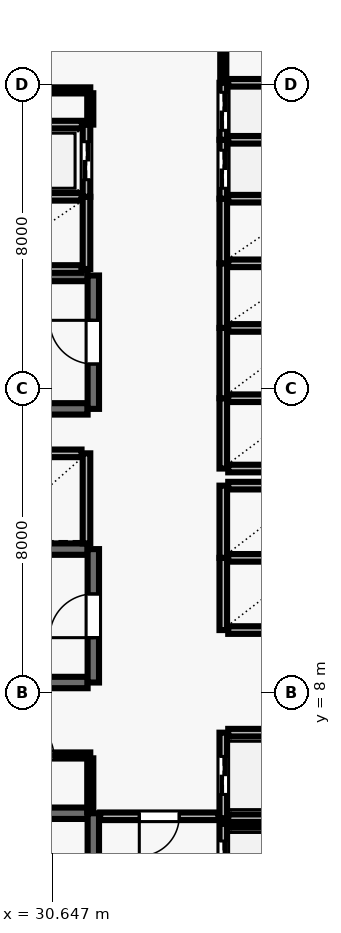
"""IFC4 building model, lengths in metres.
Left out: names, types, materials, properties, quantities, classifications, styles, units other than length and angle.
Written with IfcOpenShell. Run it as: python <this file> out.ifc"""

import sys

from ifc_helpers import new_model, si_unit, direction, frame, frame_2d, origin, place, context, subcontext, project, spatial, rectangle, extrude, element, fill, save


model = new_model("IFC4")
c1 = context("Model", 3, precision=1e-05, world=origin(), true_north=direction((0.0, 1.0)))
c2 = subcontext(c1, "Body", "Model", "MODEL_VIEW")
j1 = project(units=[si_unit("LENGTHUNIT", "METRE"), si_unit("PLANEANGLEUNIT", "RADIAN")], contexts=[c1])
p1 = place(None, origin())
s1 = spatial("IfcSite", under=j1, at=p1, CompositionType="ELEMENT")
p2 = place(p1, origin())
s2 = spatial("IfcBuilding", under=s1, at=p2, CompositionType="ELEMENT")
p3 = place(p2, frame((0.0, 0.0, 54.4)))
s3 = spatial("IfcBuildingStorey", under=s2, at=p3, CompositionType="ELEMENT", Elevation=54.4)
p4 = place(p3, frame((31.58, 4.83, 0.0), z_axis=(0.0, 0.0, 1.0), x_axis=(-1.0, 0.0, 0.0)))
e1 = element("IfcWall", 1, at=p4, inside=s3, PredefinedType="SHEAR", context=c2, shape_type="SweptSolid", body=[
    extrude(rectangle(XDim=8.36, YDim=0.3, at=frame_2d((4.18, 0.0))), origin(), (0.0, 0.0, 1.0), 3.69),
])
p5 = place(p3, frame((31.73, 0.96, 0.0), z_axis=(0.0, 0.0, 1.0), x_axis=(0.0, 1.0, 0.0)))
e2 = element("IfcWall", 2, at=p5, inside=s3, PredefinedType="SHEAR", context=c2, shape_type="SweptSolid", body=[
    extrude(rectangle(XDim=3.87, YDim=0.3, at=frame_2d((1.935, 0.0))), origin(), (0.0, 0.0, 1.0), 3.69),
])
p6 = place(p5, frame((1.54, 0.0, 0.0)))
e3 = element("IfcOpeningElement", 3, at=p6, cuts=e2, PredefinedType="OPENING", context=c2, shape_type="SweptSolid", body=[
    extrude(rectangle(XDim=1.15, YDim=2.15, at=frame_2d((0.575, 1.075))), frame((0.0, 0.16, 0.0), z_axis=(0.0, -1.0, 0.0), x_axis=(1.0, 0.0, 0.0)), (0.0, 0.0, 1.0), 0.32),
])
for number, where, z_axis, x_axis in (
    (4, (31.58, 18.98, 0.0), (0.0, 0.0, 1.0), (-1.0, 0.0, 0.0)),
    (5, (23.22, 15.47, 0.0), (0.0, 0.0, 1.0), (1.0, 0.0, 0.0)),
):
    element("IfcWall", number, at=place(p3, frame(where, z_axis=z_axis, x_axis=x_axis)), inside=s3, PredefinedType="SHEAR", context=c2, shape_type="SweptSolid", body=[
        extrude(rectangle(XDim=8.36, YDim=0.3, at=frame_2d((4.18, 0.0))), origin(), (0.0, 0.0, 1.0), 3.69),
    ])
p7 = place(p3, frame((31.73, 15.47, 0.0), z_axis=(0.0, 0.0, 1.0), x_axis=(0.0, 1.0, 0.0)))
e6 = element("IfcWall", 6, at=p7, inside=s3, PredefinedType="SHEAR", context=c2, shape_type="SweptSolid", body=[
    extrude(rectangle(XDim=3.51, YDim=0.3, at=frame_2d((1.755, 0.0))), origin(), (0.0, 0.0, 1.0), 3.69),
])
p8 = place(p7, frame((1.18, 0.0, 0.0)))
e7 = element("IfcOpeningElement", 7, at=p8, cuts=e6, PredefinedType="OPENING", context=c2, shape_type="SweptSolid", body=[
    extrude(rectangle(XDim=1.15, YDim=2.15, at=frame_2d((0.575, 1.075))), frame((0.0, 0.16, 0.0), z_axis=(0.0, -1.0, 0.0), x_axis=(1.0, 0.0, 0.0)), (0.0, 0.0, 1.0), 0.32),
])
for number, where, z_axis, x_axis in (
    (8, (31.58, 11.78, 0.0), (0.0, 0.0, 1.0), (-1.0, 0.0, 0.0)),
    (9, (23.22, 8.27, 0.0), (0.0, 0.0, 1.0), (1.0, 0.0, 0.0)),
):
    element("IfcWall", number, at=place(p3, frame(where, z_axis=z_axis, x_axis=x_axis)), inside=s3, PredefinedType="SHEAR", context=c2, shape_type="SweptSolid", body=[
        extrude(rectangle(XDim=8.36, YDim=0.3, at=frame_2d((4.18, 0.0))), origin(), (0.0, 0.0, 1.0), 3.69),
    ])
p9 = place(p3, frame((31.73, 8.27, 0.0), z_axis=(0.0, 0.0, 1.0), x_axis=(0.0, 1.0, 0.0)))
e10 = element("IfcWall", 10, at=p9, inside=s3, PredefinedType="SHEAR", context=c2, shape_type="SweptSolid", body=[
    extrude(rectangle(XDim=3.51, YDim=0.3, at=frame_2d((1.755, 0.0))), origin(), (0.0, 0.0, 1.0), 3.69),
])
p10 = place(p9, frame((1.18, 0.0, 0.0)))
e11 = element("IfcOpeningElement", 11, at=p10, cuts=e10, PredefinedType="OPENING", context=c2, shape_type="SweptSolid", body=[
    extrude(rectangle(XDim=1.15, YDim=2.15, at=frame_2d((0.575, 1.075))), frame((0.0, 0.16, 0.0), z_axis=(0.0, -1.0, 0.0), x_axis=(1.0, 0.0, 0.0)), (0.0, 0.0, 1.0), 0.32),
])
p11 = place(p3, frame((35.15, 4.55, 0.0), z_axis=(0.0, 0.0, 1.0), x_axis=(0.0, -1.0, 0.0)))
e12 = element("IfcWall", 12, at=p11, inside=s3, PredefinedType="SOLIDWALL", context=c2, shape_type="SweptSolid", body=[
    extrude(rectangle(XDim=2.1, YDim=0.2, at=frame_2d((1.05, 0.0))), origin(), (0.0, 0.0, 1.0), 3.69),
])
p12 = place(p11, frame((0.45, 0.0, 0.0)))
e13 = element("IfcOpeningElement", 13, at=p12, cuts=e12, PredefinedType="OPENING", context=c2, shape_type="SweptSolid", body=[
    extrude(rectangle(XDim=1.2, YDim=2.15, at=frame_2d((0.6, 1.075))), frame((0.0, 0.11, 0.0), z_axis=(0.0, -1.0, 0.0), x_axis=(1.0, 0.0, 0.0)), (0.0, 0.0, 1.0), 0.22),
])
p13 = place(p3, frame((37.42, 4.55, 0.0), z_axis=(0.0, 0.0, 1.0), x_axis=(-1.0, 0.0, 0.0)))
e14 = element("IfcWall", 14, at=p13, inside=s3, PredefinedType="SOLIDWALL", context=c2, shape_type="SweptSolid", body=[
    extrude(rectangle(XDim=2.14, YDim=0.2, at=frame_2d((1.07, 0.0))), origin(), (0.0, 0.0, 1.0), 3.69),
])
p14 = place(p3, frame((35.15, 6.95, 0.0), z_axis=(0.0, 0.0, 1.0), x_axis=(0.0, -1.0, 0.0)))
e15 = element("IfcWall", 15, at=p14, inside=s3, PredefinedType="SOLIDWALL", context=c2, shape_type="SweptSolid", body=[
    extrude(rectangle(XDim=2.25, YDim=0.2, at=frame_2d((1.125, 0.0))), origin(), (0.0, 0.0, 1.0), 3.69),
])
p15 = place(p14, frame((0.625, 0.0, 0.0)))
e16 = element("IfcOpeningElement", 16, at=p15, cuts=e15, PredefinedType="OPENING", context=c2, shape_type="SweptSolid", body=[
    extrude(rectangle(XDim=1.0, YDim=2.1, at=frame_2d((0.5, 1.05))), frame((0.0, 0.11, 0.0), z_axis=(0.0, -1.0, 0.0), x_axis=(1.0, 0.0, 0.0)), (0.0, 0.0, 1.0), 0.22),
])
for number, where, z_axis, x_axis in (
    (17, (35.28, 4.7, 0.0), (0.0, 0.0, 1.0), (1.0, 0.0, 0.0)),
    (18, (37.42, 6.95, 0.0), (0.0, 0.0, 1.0), (-1.0, 0.0, 0.0)),
):
    element("IfcWall", number, at=place(p3, frame(where, z_axis=z_axis, x_axis=x_axis)), inside=s3, PredefinedType="SOLIDWALL", context=c2, shape_type="SweptSolid", body=[
        extrude(rectangle(XDim=2.14, YDim=0.2, at=frame_2d((1.07, 0.0))), origin(), (0.0, 0.0, 1.0), 3.69),
    ])
p16 = place(p3, frame((35.15, 11.55, 0.0), z_axis=(0.0, 0.0, 1.0), x_axis=(0.0, -1.0, 0.0)))
e19 = element("IfcWall", 19, at=p16, inside=s3, PredefinedType="SOLIDWALL", context=c2, shape_type="SweptSolid", body=[
    extrude(rectangle(XDim=1.9, YDim=0.2, at=frame_2d((0.95, 0.0))), origin(), (0.0, 0.0, 1.0), 3.69),
])
for number, where, z_axis, x_axis in (
    (20, (35.28, 9.65, 0.0), (0.0, 0.0, 1.0), (1.0, 0.0, 0.0)),
    (21, (37.42, 11.55, 0.0), (0.0, 0.0, 1.0), (-1.0, 0.0, 0.0)),
):
    element("IfcWall", number, at=place(p3, frame(where, z_axis=z_axis, x_axis=x_axis)), inside=s3, PredefinedType="SOLIDWALL", context=c2, shape_type="SweptSolid", body=[
        extrude(rectangle(XDim=2.14, YDim=0.2, at=frame_2d((1.07, 0.0))), origin(), (0.0, 0.0, 1.0), 3.69),
    ])
p17 = place(p3, frame((35.15, 13.45, 0.0), z_axis=(0.0, 0.0, 1.0), x_axis=(0.0, -1.0, 0.0)))
e22 = element("IfcWall", 22, at=p17, inside=s3, PredefinedType="SOLIDWALL", context=c2, shape_type="SweptSolid", body=[
    extrude(rectangle(XDim=1.9, YDim=0.2, at=frame_2d((0.95, 0.0))), origin(), (0.0, 0.0, 1.0), 3.69),
])
p18 = place(p3, frame((37.42, 13.45, 0.0), z_axis=(0.0, 0.0, 1.0), x_axis=(-1.0, 0.0, 0.0)))
e23 = element("IfcWall", 23, at=p18, inside=s3, PredefinedType="SOLIDWALL", context=c2, shape_type="SweptSolid", body=[
    extrude(rectangle(XDim=2.14, YDim=0.2, at=frame_2d((1.07, 0.0))), origin(), (0.0, 0.0, 1.0), 3.69),
])
p19 = place(p3, frame((31.55, 11.93, 0.0), z_axis=(0.0, 0.0, 1.0), x_axis=(0.0, 1.0, 0.0)))
e24 = element("IfcWall", 24, at=p19, inside=s3, PredefinedType="SOLIDWALL", context=c2, shape_type="SweptSolid", body=[
    extrude(rectangle(XDim=2.37, YDim=0.2, at=frame_2d((1.185, 0.0))), origin(), (0.0, 0.0, 1.0), 3.69),
])
p20 = place(p3, frame((31.42, 14.3, 0.0), z_axis=(0.0, 0.0, 1.0), x_axis=(-1.0, 0.0, 0.0)))
e25 = element("IfcWall", 25, at=p20, inside=s3, PredefinedType="SOLIDWALL", context=c2, shape_type="SweptSolid", body=[
    extrude(rectangle(XDim=2.44, YDim=0.2, at=frame_2d((1.22, 0.0))), origin(), (0.0, 0.0, 1.0), 3.69),
])
p21 = place(p3, frame((35.15, 15.75, 0.0), z_axis=(0.0, 0.0, 1.0), x_axis=(0.0, -1.0, 0.0)))
e26 = element("IfcWall", 26, at=p21, inside=s3, PredefinedType="SOLIDWALL", context=c2, shape_type="SweptSolid", body=[
    extrude(rectangle(XDim=1.85, YDim=0.2, at=frame_2d((0.925, 0.0))), origin(), (0.0, 0.0, 1.0), 3.69),
])
for number, where, z_axis, x_axis in (
    (27, (35.28, 13.9, 0.0), (0.0, 0.0, 1.0), (1.0, 0.0, 0.0)),
    (28, (37.42, 15.75, 0.0), (0.0, 0.0, 1.0), (-1.0, 0.0, 0.0)),
):
    element("IfcWall", number, at=place(p3, frame(where, z_axis=z_axis, x_axis=x_axis)), inside=s3, PredefinedType="SOLIDWALL", context=c2, shape_type="SweptSolid", body=[
        extrude(rectangle(XDim=2.14, YDim=0.2, at=frame_2d((1.07, 0.0))), origin(), (0.0, 0.0, 1.0), 3.69),
    ])
p22 = place(p3, frame((35.15, 17.6, 0.0), z_axis=(0.0, 0.0, 1.0), x_axis=(0.0, -1.0, 0.0)))
e29 = element("IfcWall", 29, at=p22, inside=s3, PredefinedType="SOLIDWALL", context=c2, shape_type="SweptSolid", body=[
    extrude(rectangle(XDim=1.85, YDim=0.2, at=frame_2d((0.925, 0.0))), origin(), (0.0, 0.0, 1.0), 3.69),
])
p23 = place(p3, frame((37.42, 17.6, 0.0), z_axis=(0.0, 0.0, 1.0), x_axis=(-1.0, 0.0, 0.0)))
e30 = element("IfcWall", 30, at=p23, inside=s3, PredefinedType="SOLIDWALL", context=c2, shape_type="SweptSolid", body=[
    extrude(rectangle(XDim=2.14, YDim=0.2, at=frame_2d((1.07, 0.0))), origin(), (0.0, 0.0, 1.0), 3.69),
])
p24 = place(p3, frame((35.15, 19.3, 0.0), z_axis=(0.0, 0.0, 1.0), x_axis=(0.0, -1.0, 0.0)))
e31 = element("IfcWall", 31, at=p24, inside=s3, PredefinedType="SOLIDWALL", context=c2, shape_type="SweptSolid", body=[
    extrude(rectangle(XDim=1.7, YDim=0.2, at=frame_2d((0.85, 0.0))), origin(), (0.0, 0.0, 1.0), 3.69),
])
p25 = place(p3, frame((37.42, 19.3, 0.0), z_axis=(0.0, 0.0, 1.0), x_axis=(-1.0, 0.0, 0.0)))
e32 = element("IfcWall", 32, at=p25, inside=s3, PredefinedType="SOLIDWALL", context=c2, shape_type="SweptSolid", body=[
    extrude(rectangle(XDim=2.14, YDim=0.2, at=frame_2d((1.07, 0.0))), origin(), (0.0, 0.0, 1.0), 3.69),
])
p26 = place(p3, frame((35.15, 21.0, 0.0), z_axis=(0.0, 0.0, 1.0), x_axis=(0.0, -1.0, 0.0)))
e33 = element("IfcWall", 33, at=p26, inside=s3, PredefinedType="SOLIDWALL", context=c2, shape_type="SweptSolid", body=[
    extrude(rectangle(XDim=1.7, YDim=0.2, at=frame_2d((0.85, 0.0))), origin(), (0.0, 0.0, 1.0), 3.69),
])
p27 = place(p3, frame((37.42, 21.0, 0.0), z_axis=(0.0, 0.0, 1.0), x_axis=(-1.0, 0.0, 0.0)))
e34 = element("IfcWall", 34, at=p27, inside=s3, PredefinedType="SOLIDWALL", context=c2, shape_type="SweptSolid", body=[
    extrude(rectangle(XDim=2.14, YDim=0.2, at=frame_2d((1.07, 0.0))), origin(), (0.0, 0.0, 1.0), 3.69),
])
p28 = place(p3, frame((31.55, 19.15, 0.0), z_axis=(0.0, 0.0, 1.0), x_axis=(0.0, 1.0, 0.0)))
e35 = element("IfcWall", 35, at=p28, inside=s3, PredefinedType="SOLIDWALL", context=c2, shape_type="SweptSolid", body=[
    extrude(rectangle(XDim=1.9, YDim=0.2, at=frame_2d((0.95, 0.0))), origin(), (0.0, 0.0, 1.0), 3.69),
])
for number, where, z_axis, x_axis in (
    (36, (28.98, 19.15, 0.0), (0.0, 0.0, 1.0), (1.0, 0.0, 0.0)),
    (37, (31.42, 21.05, 0.0), (0.0, 0.0, 1.0), (-1.0, 0.0, 0.0)),
):
    element("IfcWall", number, at=place(p3, frame(where, z_axis=z_axis, x_axis=x_axis)), inside=s3, PredefinedType="SOLIDWALL", context=c2, shape_type="SweptSolid", body=[
        extrude(rectangle(XDim=2.44, YDim=0.2, at=frame_2d((1.22, 0.0))), origin(), (0.0, 0.0, 1.0), 3.69),
    ])
p29 = place(p3, frame((35.15, 22.55, 0.0), z_axis=(0.0, 0.0, 1.0), x_axis=(0.0, -1.0, 0.0)))
e38 = element("IfcWall", 38, at=p29, inside=s3, PredefinedType="SOLIDWALL", context=c2, shape_type="SweptSolid", body=[
    extrude(rectangle(XDim=1.55, YDim=0.2, at=frame_2d((0.775, 0.0))), origin(), (0.0, 0.0, 1.0), 3.69),
])
p30 = place(p29, frame((0.275, 0.0, 0.0)))
e39 = element("IfcOpeningElement", 39, at=p30, cuts=e38, PredefinedType="OPENING", context=c2, shape_type="SweptSolid", body=[
    extrude(rectangle(XDim=1.0, YDim=2.1, at=frame_2d((0.5, 1.05))), frame((0.0, 0.11, 0.0), z_axis=(0.0, -1.0, 0.0), x_axis=(1.0, 0.0, 0.0)), (0.0, 0.0, 1.0), 0.22),
])
p31 = place(p3, frame((37.42, 22.55, 0.0), z_axis=(0.0, 0.0, 1.0), x_axis=(-1.0, 0.0, 0.0)))
e40 = element("IfcWall", 40, at=p31, inside=s3, PredefinedType="SOLIDWALL", context=c2, shape_type="SweptSolid", body=[
    extrude(rectangle(XDim=2.14, YDim=0.2, at=frame_2d((1.07, 0.0))), origin(), (0.0, 0.0, 1.0), 3.69),
])
p32 = place(p3, frame((35.15, 24.05, 0.0), z_axis=(0.0, 0.0, 1.0), x_axis=(0.0, -1.0, 0.0)))
e41 = element("IfcWall", 41, at=p32, inside=s3, PredefinedType="SOLIDWALL", context=c2, shape_type="SweptSolid", body=[
    extrude(rectangle(XDim=1.5, YDim=0.2, at=frame_2d((0.75, 0.0))), origin(), (0.0, 0.0, 1.0), 3.69),
])
p33 = place(p32, frame((0.25, 0.0, 0.0)))
e42 = element("IfcOpeningElement", 42, at=p33, cuts=e41, PredefinedType="OPENING", context=c2, shape_type="SweptSolid", body=[
    extrude(rectangle(XDim=1.0, YDim=2.1, at=frame_2d((0.5, 1.05))), frame((0.0, 0.11, 0.0), z_axis=(0.0, -1.0, 0.0), x_axis=(1.0, 0.0, 0.0)), (0.0, 0.0, 1.0), 0.22),
])
p34 = place(p3, frame((37.42, 24.05, 0.0), z_axis=(0.0, 0.0, 1.0), x_axis=(-1.0, 0.0, 0.0)))
e43 = element("IfcWall", 43, at=p34, inside=s3, PredefinedType="SOLIDWALL", context=c2, shape_type="SweptSolid", body=[
    extrude(rectangle(XDim=2.14, YDim=0.2, at=frame_2d((1.07, 0.0))), origin(), (0.0, 0.0, 1.0), 3.69),
])
p35 = place(p3, frame((31.55, 21.05, 0.0), z_axis=(0.0, 0.0, 1.0), x_axis=(0.0, 1.0, 0.0)))
e44 = element("IfcWall", 44, at=p35, inside=s3, PredefinedType="SOLIDWALL", context=c2, shape_type="SweptSolid", body=[
    extrude(rectangle(XDim=1.9, YDim=0.2, at=frame_2d((0.95, 0.0))), origin(), (0.0, 0.0, 1.0), 3.69),
])
p36 = place(p35, frame((0.45, 0.0, 0.0)))
e45 = element("IfcOpeningElement", 45, at=p36, cuts=e44, PredefinedType="OPENING", context=c2, shape_type="SweptSolid", body=[
    extrude(rectangle(XDim=1.0, YDim=2.1, at=frame_2d((0.5, 1.05))), frame((0.0, 0.11, 0.0), z_axis=(0.0, -1.0, 0.0), x_axis=(1.0, 0.0, 0.0)), (0.0, 0.0, 1.0), 0.22),
])
p37 = place(p3, frame((31.43, 22.95, 0.0), z_axis=(0.0, 0.0, 1.0), x_axis=(-1.0, 0.0, 0.0)))
e46 = element("IfcWall", 46, at=p37, inside=s3, PredefinedType="SOLIDWALL", context=c2, shape_type="SweptSolid", body=[
    extrude(rectangle(XDim=2.46, YDim=0.2, at=frame_2d((1.23, 0.0))), origin(), (0.0, 0.0, 1.0), 3.69),
])
p38 = place(p3, frame((28.8, 23.85, 0.0), z_axis=(0.0, 0.0, 1.0), x_axis=(1.0, 0.0, 0.0)))
e47 = element("IfcWall", 47, at=p38, inside=s3, PredefinedType="PARTITIONING", context=c2, shape_type="SweptSolid", body=[
    extrude(rectangle(XDim=2.85, YDim=0.16, at=frame_2d((1.425, 0.0))), origin(), (0.0, 0.0, 1.0), 3.69),
])
p39 = place(p3, frame((28.85, 6.35, 0.0), z_axis=(0.0, 0.0, 1.0), x_axis=(1.0, 0.0, 0.0)))
e48 = element("IfcWall", 48, at=p39, inside=s3, PredefinedType="PARTITIONING", context=c2, shape_type="SweptSolid", body=[
    extrude(rectangle(XDim=2.8, YDim=0.16, at=frame_2d((1.4, 0.0))), origin(), (0.0, 0.0, 1.0), 3.69),
])
p40 = place(p39, frame((0.96, 0.0, 0.0)))
e49 = element("IfcOpeningElement", 49, at=p40, cuts=e48, PredefinedType="OPENING", context=c2, shape_type="SweptSolid", body=[
    extrude(rectangle(XDim=0.88, YDim=2.1, at=frame_2d((0.44, 1.05))), frame((0.0, 0.09, 0.0), z_axis=(0.0, -1.0, 0.0), x_axis=(1.0, 0.0, 0.0)), (0.0, 0.0, 1.0), 0.18),
])
p41 = place(p3, frame((35.02, 4.75, 0.0), z_axis=(0.0, 0.0, 1.0), x_axis=(-1.0, 0.0, 0.0)))
e50 = element("IfcWall", 50, at=p41, inside=s3, PredefinedType="SOLIDWALL", context=c2, shape_type="SweptSolid", body=[
    extrude(rectangle(XDim=3.11, YDim=0.2, at=frame_2d((1.555, 0.0))), origin(), (0.0, 0.0, 1.0), 3.69),
])
p42 = place(p41, frame((1.03, 0.0, 0.0)))
e51 = element("IfcOpeningElement", 51, at=p42, cuts=e50, PredefinedType="OPENING", context=c2, shape_type="SweptSolid", body=[
    extrude(rectangle(XDim=1.05, YDim=2.15, at=frame_2d((0.525, 1.075))), frame((0.0, 0.11, 0.0), z_axis=(0.0, -1.0, 0.0), x_axis=(1.0, 0.0, 0.0)), (0.0, 0.0, 1.0), 0.22),
])
p43 = place(p3, frame((31.65, 4.86, 0.0), z_axis=(0.0, 0.0, 1.0), x_axis=(0.0, 1.0, 0.0)))
e52 = element("IfcWall", 52, at=p43, inside=s3, PredefinedType="PARTITIONING", context=c2, shape_type="SweptSolid", body=[
    extrude(rectangle(XDim=1.415, YDim=0.16, at=frame_2d((0.708, 0.0))), origin(), (0.0, 0.0, 1.0), 3.69),
])
p44 = place(p3, frame((31.65, 23.775, 0.0), z_axis=(0.0, 0.0, 1.0), x_axis=(0.0, -1.0, 0.0)))
e53 = element("IfcWall", 53, at=p44, inside=s3, PredefinedType="PARTITIONING", context=c2, shape_type="SweptSolid", body=[
    extrude(rectangle(XDim=0.825, YDim=0.16, at=frame_2d((0.413, 0.0))), origin(), (0.0, 0.0, 1.0), 3.69),
])
p45 = place(p3, frame((35.15, 24.07, 0.0), z_axis=(0.0, 0.0, 1.0), x_axis=(0.0, 1.0, 0.0)))
e54 = element("IfcWall", 54, at=p45, inside=s3, PredefinedType="PARTITIONING", context=c2, shape_type="SweptSolid", body=[
    extrude(rectangle(XDim=1.855, YDim=0.16, at=frame_2d((0.927, 0.0))), origin(), (0.0, 0.0, 1.0), 3.69),
])
p46 = place(p8, origin())
e55 = element("IfcDoor", 55, at=p46, inside=s3, OperationType="SINGLE_SWING_RIGHT", PredefinedType="DOOR", context=c2, shape_type="SweptSolid", body=[
    extrude(rectangle(XDim=1.15, YDim=2.15, at=frame_2d((0.575, 1.075))), frame((0.0, 0.025, 0.0), z_axis=(0.0, -1.0, 0.0), x_axis=(1.0, 0.0, 0.0)), (0.0, 0.0, 1.0), 0.05),
])
fill(e7, e55)
p47 = place(p10, origin())
e56 = element("IfcDoor", 56, at=p47, inside=s3, OperationType="SINGLE_SWING_LEFT", PredefinedType="DOOR", context=c2, shape_type="SweptSolid", body=[
    extrude(rectangle(XDim=1.15, YDim=2.15, at=frame_2d((0.575, 1.075))), frame((0.0, 0.025, 0.0), z_axis=(0.0, -1.0, 0.0), x_axis=(1.0, 0.0, 0.0)), (0.0, 0.0, 1.0), 0.05),
])
fill(e11, e56)
p48 = place(p12, origin())
e57 = element("IfcDoor", 57, at=p48, inside=s3, OperationType="DOUBLE_DOOR_SLIDING", PredefinedType="DOOR", context=c2, shape_type="SweptSolid", body=[
    extrude(rectangle(XDim=1.2, YDim=2.15, at=frame_2d((0.6, 1.075))), frame((0.0, 0.025, 0.0), z_axis=(0.0, -1.0, 0.0), x_axis=(1.0, 0.0, 0.0)), (0.0, 0.0, 1.0), 0.05),
])
fill(e13, e57)
p49 = place(p15, origin())
e58 = element("IfcDoor", 58, at=p49, inside=s3, OperationType="DOUBLE_DOOR_SLIDING", PredefinedType="DOOR", context=c2, shape_type="SweptSolid", body=[
    extrude(rectangle(XDim=1.0, YDim=2.1, at=frame_2d((0.5, 1.05))), frame((0.0, 0.025, 0.0), z_axis=(0.0, -1.0, 0.0), x_axis=(1.0, 0.0, 0.0)), (0.0, 0.0, 1.0), 0.05),
])
fill(e16, e58)
p50 = place(p30, origin())
e59 = element("IfcDoor", 59, at=p50, inside=s3, OperationType="DOUBLE_DOOR_SLIDING", PredefinedType="DOOR", context=c2, shape_type="SweptSolid", body=[
    extrude(rectangle(XDim=1.0, YDim=2.1, at=frame_2d((0.5, 1.05))), frame((0.0, 0.025, 0.0), z_axis=(0.0, -1.0, 0.0), x_axis=(1.0, 0.0, 0.0)), (0.0, 0.0, 1.0), 0.05),
])
fill(e39, e59)
p51 = place(p33, origin())
e60 = element("IfcDoor", 60, at=p51, inside=s3, OperationType="DOUBLE_DOOR_SLIDING", PredefinedType="DOOR", context=c2, shape_type="SweptSolid", body=[
    extrude(rectangle(XDim=1.0, YDim=2.1, at=frame_2d((0.5, 1.05))), frame((0.0, 0.025, 0.0), z_axis=(0.0, -1.0, 0.0), x_axis=(1.0, 0.0, 0.0)), (0.0, 0.0, 1.0), 0.05),
])
fill(e42, e60)
p52 = place(p36, origin())
e61 = element("IfcDoor", 61, at=p52, inside=s3, OperationType="DOUBLE_DOOR_SLIDING", PredefinedType="DOOR", context=c2, shape_type="SweptSolid", body=[
    extrude(rectangle(XDim=1.0, YDim=2.1, at=frame_2d((0.5, 1.05))), frame((0.0, 0.025, 0.0), z_axis=(0.0, -1.0, 0.0), x_axis=(1.0, 0.0, 0.0)), (0.0, 0.0, 1.0), 0.05),
])
fill(e45, e61)
p53 = place(p42, origin())
e62 = element("IfcDoor", 62, at=p53, inside=s3, OperationType="SINGLE_SWING_RIGHT", PredefinedType="DOOR", context=c2, shape_type="SweptSolid", body=[
    extrude(rectangle(XDim=1.05, YDim=2.15, at=frame_2d((0.525, 1.075))), frame((0.0, 0.025, 0.0), z_axis=(0.0, -1.0, 0.0), x_axis=(1.0, 0.0, 0.0)), (0.0, 0.0, 1.0), 0.05),
])
fill(e51, e62)
p54 = place(p40, origin())
e63 = element("IfcDoor", 63, at=p54, inside=s3, OperationType="SINGLE_SWING_LEFT", PredefinedType="DOOR", context=c2, shape_type="SweptSolid", body=[
    extrude(rectangle(XDim=0.88, YDim=2.1, at=frame_2d((0.44, 1.05))), frame((0.0, 0.025, 0.0), z_axis=(0.0, -1.0, 0.0), x_axis=(1.0, 0.0, 0.0)), (0.0, 0.0, 1.0), 0.05),
])
fill(e49, e63)
save(model, sys.argv[1])
